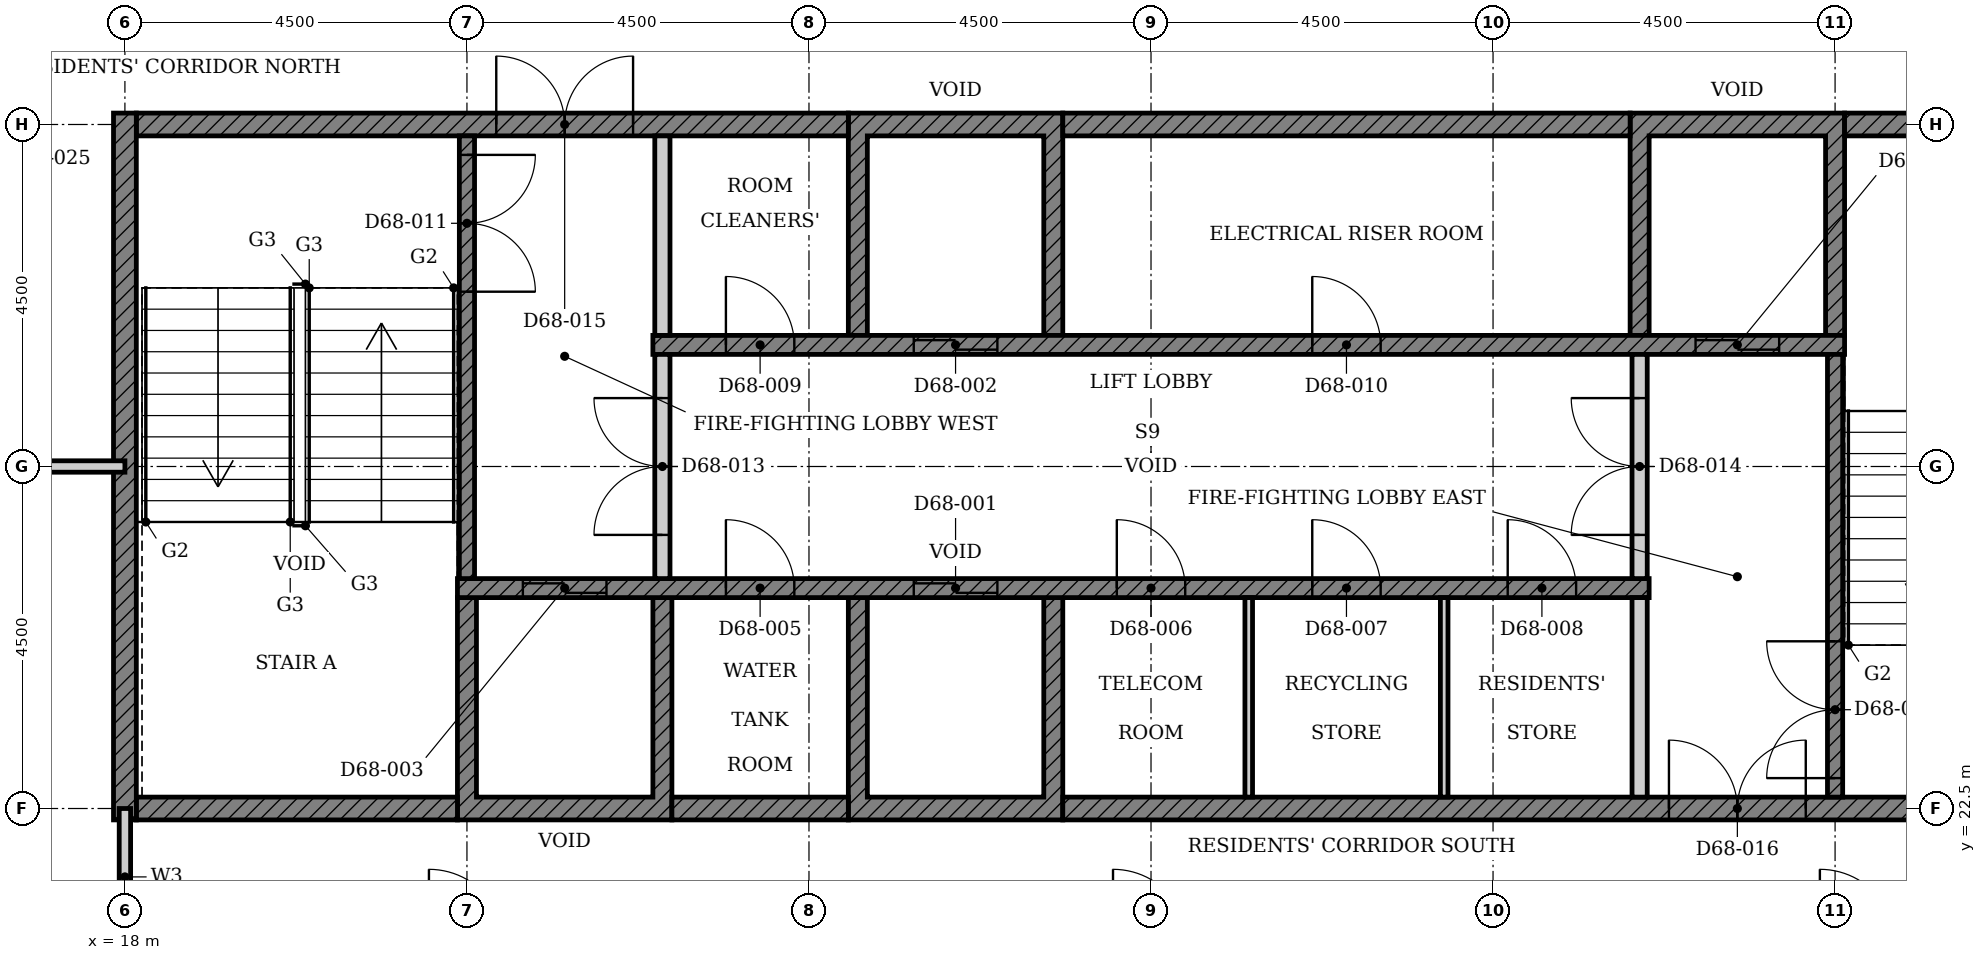
"""IFC4 building model, lengths in metres.
Left out: names, types, materials, properties, quantities, classifications, styles, units other than length and angle.
Written with IfcOpenShell. Run it as: python <this file> out.ifc"""

import sys

from ifc_helpers import new_model, si_unit, direction, frame, frame_2d, origin, place, context, subcontext, project, spatial, polyline, rectangle, outline, extrude, element, fill, save


model = new_model("IFC4")
c1 = context("Model", 3, precision=1e-05, world=origin(), true_north=direction((0.0, 1.0)))
c2 = subcontext(c1, "Body", "Model", "MODEL_VIEW")
j1 = project(units=[si_unit("LENGTHUNIT", "METRE"), si_unit("PLANEANGLEUNIT", "RADIAN")], contexts=[c1])
p1 = place(None, origin())
s1 = spatial("IfcSite", under=j1, at=p1, CompositionType="ELEMENT")
p2 = place(p1, origin())
s2 = spatial("IfcBuilding", under=s1, at=p2, CompositionType="ELEMENT")
p3 = place(p2, frame((0.0, 0.0, 267.5)))
s3 = spatial("IfcBuildingStorey", under=s2, at=p3, CompositionType="ELEMENT", Elevation=267.5)
p4 = place(p3, origin())
e1 = element("IfcWall", 1, at=p4, inside=s3, PredefinedType="SHEAR", context=c2, shape_type="SweptSolid", body=[
    extrude(outline(polyline([(22.375, 22.35), (25.197, 22.35), (25.197, 25.275), (24.947, 25.275), (24.947, 22.65), (22.625, 22.65), (22.625, 25.275), (22.375, 25.275), (22.375, 22.35)])), origin(), (0.0, 0.0, 1.0), 3.4),
])
p5 = place(p3, origin())
e2 = element("IfcWall", 2, at=p5, inside=s3, PredefinedType="SHEAR", context=c2, shape_type="SweptSolid", body=[
    extrude(outline(polyline([(27.518, 22.35), (30.339, 22.35), (30.339, 25.275), (30.089, 25.275), (30.089, 22.65), (27.768, 22.65), (27.768, 25.275), (27.518, 25.275), (27.518, 22.35)])), origin(), (0.0, 0.0, 1.0), 3.4),
])
p6 = place(p3, origin())
e3 = element("IfcWall", 3, at=p6, inside=s3, PredefinedType="SHEAR", context=c2, shape_type="SweptSolid", body=[
    extrude(outline(polyline([(27.518, 28.725), (27.768, 28.725), (27.768, 31.35), (30.089, 31.35), (30.089, 28.725), (30.339, 28.725), (30.339, 31.65), (27.518, 31.65), (27.518, 28.725)])), origin(), (0.0, 0.0, 1.0), 3.4),
])
p7 = place(p3, origin())
e4 = element("IfcWall", 4, at=p7, inside=s3, PredefinedType="SHEAR", context=c2, shape_type="SweptSolid", body=[
    extrude(outline(polyline([(37.803, 28.725), (38.053, 28.725), (38.053, 31.35), (40.375, 31.35), (40.375, 28.725), (40.625, 28.725), (40.625, 31.65), (37.803, 31.65), (37.803, 28.725)])), origin(), (0.0, 0.0, 1.0), 3.4),
])
p8 = place(p3, frame((18.15, 22.5, 0.0), z_axis=(0.0, 0.0, 1.0), x_axis=(1.0, 0.0, 0.0)))
e5 = element("IfcWall", 5, at=p8, inside=s3, PredefinedType="SHEAR", context=c2, shape_type="SweptSolid", body=[
    extrude(rectangle(XDim=4.225, YDim=0.3, at=frame_2d((2.113, 0.0))), origin(), (0.0, 0.0, 1.0), 3.4),
])
p9 = place(p3, frame((25.197, 22.5, 0.0), z_axis=(0.0, 0.0, 1.0), x_axis=(1.0, 0.0, 0.0)))
e6 = element("IfcWall", 6, at=p9, inside=s3, PredefinedType="SHEAR", context=c2, shape_type="SweptSolid", body=[
    extrude(rectangle(XDim=2.321, YDim=0.3, at=frame_2d((1.161, 0.0))), origin(), (0.0, 0.0, 1.0), 3.4),
])
p10 = place(p3, frame((30.339, 22.5, 0.0), z_axis=(0.0, 0.0, 1.0), x_axis=(1.0, 0.0, 0.0)))
e7 = element("IfcWall", 7, at=p10, inside=s3, PredefinedType="SHEAR", context=c2, shape_type="SweptSolid", body=[
    extrude(rectangle(XDim=14.511, YDim=0.3, at=frame_2d((7.255, 0.0))), origin(), (0.0, 0.0, 1.0), 3.4),
])
p11 = place(p10, frame((7.975, 0.0, 0.0)))
e8 = element("IfcOpeningElement", 8, at=p11, cuts=e7, PredefinedType="OPENING", context=c2, shape_type="SweptSolid", body=[
    extrude(rectangle(XDim=1.8, YDim=2.1, at=frame_2d((0.9, 1.05))), frame((0.0, 0.16, 0.0), z_axis=(0.0, -1.0, 0.0), x_axis=(1.0, 0.0, 0.0)), (0.0, 0.0, 1.0), 0.32),
])
p12 = place(p3, frame((18.15, 31.5, 0.0), z_axis=(0.0, 0.0, 1.0), x_axis=(1.0, 0.0, 0.0)))
e9 = element("IfcWall", 9, at=p12, inside=s3, PredefinedType="SHEAR", context=c2, shape_type="SweptSolid", body=[
    extrude(rectangle(XDim=9.368, YDim=0.3, at=frame_2d((4.684, 0.0))), origin(), (0.0, 0.0, 1.0), 3.4),
])
p13 = place(p12, frame((4.736, 0.0, 0.0)))
e10 = element("IfcOpeningElement", 10, at=p13, cuts=e9, PredefinedType="OPENING", context=c2, shape_type="SweptSolid", body=[
    extrude(rectangle(XDim=1.8, YDim=2.1, at=frame_2d((0.9, 1.05))), frame((0.0, 0.16, 0.0), z_axis=(0.0, -1.0, 0.0), x_axis=(1.0, 0.0, 0.0)), (0.0, 0.0, 1.0), 0.32),
])
p14 = place(p3, frame((30.339, 31.5, 0.0), z_axis=(0.0, 0.0, 1.0), x_axis=(1.0, 0.0, 0.0)))
e11 = element("IfcWall", 11, at=p14, inside=s3, PredefinedType="SHEAR", context=c2, shape_type="SweptSolid", body=[
    extrude(rectangle(XDim=7.464, YDim=0.3, at=frame_2d((3.732, 0.0))), origin(), (0.0, 0.0, 1.0), 3.4),
])
p15 = place(p3, frame((40.625, 31.5, 0.0), z_axis=(0.0, 0.0, 1.0), x_axis=(1.0, 0.0, 0.0)))
e12 = element("IfcWall", 12, at=p15, inside=s3, PredefinedType="SHEAR", context=c2, shape_type="SweptSolid", body=[
    extrude(rectangle(XDim=4.225, YDim=0.3, at=frame_2d((2.113, 0.0))), origin(), (0.0, 0.0, 1.0), 3.4),
])
p16 = place(p3, frame((18.0, 22.35, 0.0), z_axis=(0.0, 0.0, 1.0), x_axis=(0.0, 1.0, 0.0)))
e13 = element("IfcWall", 13, at=p16, inside=s3, PredefinedType="SHEAR", context=c2, shape_type="SweptSolid", body=[
    extrude(rectangle(XDim=9.3, YDim=0.3, at=frame_2d((4.65, 0.0))), origin(), (0.0, 0.0, 1.0), 3.4),
])
p17 = place(p3, frame((22.375, 25.4, 0.0), z_axis=(0.0, 0.0, 1.0), x_axis=(1.0, 0.0, 0.0)))
e14 = element("IfcWall", 14, at=p17, inside=s3, PredefinedType="SHEAR", context=c2, shape_type="SweptSolid", body=[
    extrude(rectangle(XDim=15.678, YDim=0.25, at=frame_2d((7.839, 0.0))), origin(), (0.0, 0.0, 1.0), 3.4),
])
p18 = place(p17, frame((6.004, 0.0, 0.0)))
e15 = element("IfcOpeningElement", 15, at=p18, cuts=e14, PredefinedType="OPENING", context=c2, shape_type="SweptSolid", body=[
    extrude(rectangle(XDim=1.1, YDim=2.1, at=frame_2d((0.55, 1.05))), frame((0.0, 0.135, 0.0), z_axis=(0.0, -1.0, 0.0), x_axis=(1.0, 0.0, 0.0)), (0.0, 0.0, 1.0), 0.27),
])
p19 = place(p17, frame((0.861, 0.0, 0.0)))
e16 = element("IfcOpeningElement", 16, at=p19, cuts=e14, PredefinedType="OPENING", context=c2, shape_type="SweptSolid", body=[
    extrude(rectangle(XDim=1.1, YDim=2.1, at=frame_2d((0.55, 1.05))), frame((0.0, 0.135, 0.0), z_axis=(0.0, -1.0, 0.0), x_axis=(1.0, 0.0, 0.0)), (0.0, 0.0, 1.0), 0.27),
])
p20 = place(p17, frame((3.532, 0.0, 0.0)))
e17 = element("IfcOpeningElement", 17, at=p20, cuts=e14, PredefinedType="OPENING", context=c2, shape_type="SweptSolid", body=[
    extrude(rectangle(XDim=0.9, YDim=2.1, at=frame_2d((0.45, 1.05))), frame((0.0, 0.135, 0.0), z_axis=(0.0, -1.0, 0.0), x_axis=(1.0, 0.0, 0.0)), (0.0, 0.0, 1.0), 0.27),
])
p21 = place(p17, frame((8.675, 0.0, 0.0)))
e18 = element("IfcOpeningElement", 18, at=p21, cuts=e14, PredefinedType="OPENING", context=c2, shape_type="SweptSolid", body=[
    extrude(rectangle(XDim=0.9, YDim=2.1, at=frame_2d((0.45, 1.05))), frame((0.0, 0.135, 0.0), z_axis=(0.0, -1.0, 0.0), x_axis=(1.0, 0.0, 0.0)), (0.0, 0.0, 1.0), 0.27),
])
p22 = place(p17, frame((11.246, 0.0, 0.0)))
e19 = element("IfcOpeningElement", 19, at=p22, cuts=e14, PredefinedType="OPENING", context=c2, shape_type="SweptSolid", body=[
    extrude(rectangle(XDim=0.9, YDim=2.1, at=frame_2d((0.45, 1.05))), frame((0.0, 0.135, 0.0), z_axis=(0.0, -1.0, 0.0), x_axis=(1.0, 0.0, 0.0)), (0.0, 0.0, 1.0), 0.27),
])
p23 = place(p17, frame((13.818, 0.0, 0.0)))
e20 = element("IfcOpeningElement", 20, at=p23, cuts=e14, PredefinedType="OPENING", context=c2, shape_type="SweptSolid", body=[
    extrude(rectangle(XDim=0.9, YDim=2.1, at=frame_2d((0.45, 1.05))), frame((0.0, 0.135, 0.0), z_axis=(0.0, -1.0, 0.0), x_axis=(1.0, 0.0, 0.0)), (0.0, 0.0, 1.0), 0.27),
])
p24 = place(p3, frame((24.947, 28.6, 0.0), z_axis=(0.0, 0.0, 1.0), x_axis=(1.0, 0.0, 0.0)))
e21 = element("IfcWall", 21, at=p24, inside=s3, PredefinedType="SHEAR", context=c2, shape_type="SweptSolid", body=[
    extrude(rectangle(XDim=15.678, YDim=0.25, at=frame_2d((7.839, 0.0))), origin(), (0.0, 0.0, 1.0), 3.4),
])
p25 = place(p24, frame((3.432, 0.0, 0.0)))
e22 = element("IfcOpeningElement", 22, at=p25, cuts=e21, PredefinedType="OPENING", context=c2, shape_type="SweptSolid", body=[
    extrude(rectangle(XDim=1.1, YDim=2.1, at=frame_2d((0.55, 1.05))), frame((0.0, 0.135, 0.0), z_axis=(0.0, -1.0, 0.0), x_axis=(1.0, 0.0, 0.0)), (0.0, 0.0, 1.0), 0.27),
])
p26 = place(p24, frame((13.718, 0.0, 0.0)))
e23 = element("IfcOpeningElement", 23, at=p26, cuts=e21, PredefinedType="OPENING", context=c2, shape_type="SweptSolid", body=[
    extrude(rectangle(XDim=1.1, YDim=2.1, at=frame_2d((0.55, 1.05))), frame((0.0, 0.135, 0.0), z_axis=(0.0, -1.0, 0.0), x_axis=(1.0, 0.0, 0.0)), (0.0, 0.0, 1.0), 0.27),
])
p27 = place(p24, frame((0.961, 0.0, 0.0)))
e24 = element("IfcOpeningElement", 24, at=p27, cuts=e21, PredefinedType="OPENING", context=c2, shape_type="SweptSolid", body=[
    extrude(rectangle(XDim=0.9, YDim=2.1, at=frame_2d((0.45, 1.05))), frame((0.0, 0.135, 0.0), z_axis=(0.0, -1.0, 0.0), x_axis=(1.0, 0.0, 0.0)), (0.0, 0.0, 1.0), 0.27),
])
p28 = place(p24, frame((8.675, 0.0, 0.0)))
e25 = element("IfcOpeningElement", 25, at=p28, cuts=e21, PredefinedType="OPENING", context=c2, shape_type="SweptSolid", body=[
    extrude(rectangle(XDim=0.9, YDim=2.1, at=frame_2d((0.45, 1.05))), frame((0.0, 0.135, 0.0), z_axis=(0.0, -1.0, 0.0), x_axis=(1.0, 0.0, 0.0)), (0.0, 0.0, 1.0), 0.27),
])
p29 = place(p3, frame((37.928, 22.65, 0.0), z_axis=(0.0, 0.0, 1.0), x_axis=(0.0, 1.0, 0.0)))
e26 = element("IfcWall", 26, at=p29, inside=s3, PredefinedType="PARTITIONING", context=c2, shape_type="SweptSolid", body=[
    extrude(rectangle(XDim=2.625, YDim=0.2, at=frame_2d((1.312, 0.0))), origin(), (0.0, 0.0, 1.0), 3.4),
])
for number, where, z_axis, x_axis in (
    (27, (32.786, 22.65, 0.0), (0.0, 0.0, 1.0), (0.0, 1.0, 0.0)),
    (28, (35.357, 22.65, 0.0), (0.0, 0.0, 1.0), (0.0, 1.0, 0.0)),
):
    element("IfcWall", number, at=place(p3, frame(where, z_axis=z_axis, x_axis=x_axis)), inside=s3, PredefinedType="PARTITIONING", context=c2, shape_type="SweptSolid", body=[
        extrude(rectangle(XDim=2.625, YDim=0.1, at=frame_2d((1.312, 0.0))), origin(), (0.0, 0.0, 1.0), 3.4),
    ])
p30 = place(p3, frame((25.072, 28.725, 0.0), z_axis=(0.0, 0.0, 1.0), x_axis=(0.0, 1.0, 0.0)))
e29 = element("IfcWall", 29, at=p30, inside=s3, PredefinedType="PARTITIONING", context=c2, shape_type="SweptSolid", body=[
    extrude(rectangle(XDim=2.625, YDim=0.2, at=frame_2d((1.312, 0.0))), origin(), (0.0, 0.0, 1.0), 3.4),
])
p31 = place(p3, frame((22.5, 31.35, 0.0), z_axis=(0.0, 0.0, 1.0), x_axis=(0.0, -1.0, 0.0)))
e30 = element("IfcWall", 30, at=p31, inside=s3, PredefinedType="SHEAR", context=c2, shape_type="SweptSolid", body=[
    extrude(rectangle(XDim=5.825, YDim=0.2, at=frame_2d((2.913, 0.0))), origin(), (0.0, 0.0, 1.0), 3.4),
])
p32 = place(p31, frame((0.25, 0.0, 0.0)))
e31 = element("IfcOpeningElement", 31, at=p32, cuts=e30, PredefinedType="OPENING", context=c2, shape_type="SweptSolid", body=[
    extrude(rectangle(XDim=1.8, YDim=2.1, at=frame_2d((0.9, 1.05))), frame((0.0, 0.11, 0.0), z_axis=(0.0, -1.0, 0.0), x_axis=(1.0, 0.0, 0.0)), (0.0, 0.0, 1.0), 0.22),
])
p33 = place(p3, frame((40.5, 22.65, 0.0), z_axis=(0.0, 0.0, 1.0), x_axis=(0.0, 1.0, 0.0)))
e32 = element("IfcWall", 32, at=p33, inside=s3, PredefinedType="SHEAR", context=c2, shape_type="SweptSolid", body=[
    extrude(rectangle(XDim=5.825, YDim=0.2, at=frame_2d((2.913, 0.0))), origin(), (0.0, 0.0, 1.0), 3.4),
])
p34 = place(p33, frame((0.25, 0.0, 0.0)))
e33 = element("IfcOpeningElement", 33, at=p34, cuts=e32, PredefinedType="OPENING", context=c2, shape_type="SweptSolid", body=[
    extrude(rectangle(XDim=1.8, YDim=2.1, at=frame_2d((0.9, 1.05))), frame((0.0, 0.11, 0.0), z_axis=(0.0, -1.0, 0.0), x_axis=(1.0, 0.0, 0.0)), (0.0, 0.0, 1.0), 0.22),
])
p35 = place(p3, frame((25.072, 25.525, 0.0), z_axis=(0.0, 0.0, 1.0), x_axis=(0.0, 1.0, 0.0)))
e34 = element("IfcWall", 34, at=p35, inside=s3, PredefinedType="PARTITIONING", context=c2, shape_type="SweptSolid", body=[
    extrude(rectangle(XDim=2.95, YDim=0.2, at=frame_2d((1.475, 0.0))), origin(), (0.0, 0.0, 1.0), 3.4),
])
p36 = place(p35, frame((0.575, 0.0, 0.0)))
e35 = element("IfcOpeningElement", 35, at=p36, cuts=e34, PredefinedType="OPENING", context=c2, shape_type="SweptSolid", body=[
    extrude(rectangle(XDim=1.8, YDim=2.1, at=frame_2d((0.9, 1.05))), frame((0.0, 0.11, 0.0), z_axis=(0.0, -1.0, 0.0), x_axis=(1.0, 0.0, 0.0)), (0.0, 0.0, 1.0), 0.22),
])
p37 = place(p3, frame((37.928, 25.525, 0.0), z_axis=(0.0, 0.0, 1.0), x_axis=(0.0, 1.0, 0.0)))
e36 = element("IfcWall", 36, at=p37, inside=s3, PredefinedType="PARTITIONING", context=c2, shape_type="SweptSolid", body=[
    extrude(rectangle(XDim=2.95, YDim=0.2, at=frame_2d((1.475, 0.0))), origin(), (0.0, 0.0, 1.0), 3.4),
])
p38 = place(p37, frame((0.575, 0.0, 0.0)))
e37 = element("IfcOpeningElement", 37, at=p38, cuts=e36, PredefinedType="OPENING", context=c2, shape_type="SweptSolid", body=[
    extrude(rectangle(XDim=1.8, YDim=2.1, at=frame_2d((0.9, 1.05))), frame((0.0, 0.11, 0.0), z_axis=(0.0, -1.0, 0.0), x_axis=(1.0, 0.0, 0.0)), (0.0, 0.0, 1.0), 0.22),
])
p39 = place(p3, frame((4.5, 27.0, 0.0), z_axis=(0.0, 0.0, 1.0), x_axis=(1.0, 0.0, 0.0)))
e38 = element("IfcWall", 38, at=p39, inside=s3, PredefinedType="PARTITIONING", context=c2, shape_type="SweptSolid", body=[
    extrude(rectangle(XDim=13.5, YDim=0.15, at=frame_2d((6.75, 0.0))), origin(), (0.0, 0.0, 1.0), 2.68),
])
p40 = place(p39, frame((5.35, 0.0, 0.0)))
e39 = element("IfcOpeningElement", 39, at=p40, cuts=e38, PredefinedType="OPENING", context=c2, shape_type="SweptSolid", body=[
    extrude(rectangle(XDim=1.0, YDim=2.1, at=frame_2d((0.5, 1.05))), frame((0.0, 0.085, 0.0), z_axis=(0.0, -1.0, 0.0), x_axis=(1.0, 0.0, 0.0)), (0.0, 0.0, 1.0), 0.17),
])
p41 = place(p3, frame((18.0, 20.7, 0.0), z_axis=(0.0, 0.0, 1.0), x_axis=(0.0, 1.0, 0.0)))
e40 = element("IfcWall", 40, at=p41, inside=s3, PredefinedType="PARTITIONING", context=c2, shape_type="SweptSolid", body=[
    extrude(rectangle(XDim=1.8, YDim=0.15, at=frame_2d((0.9, 0.0))), origin(), (0.0, 0.0, 1.0), 3.4),
])
p42 = place(p18, origin())
e41 = element("IfcDoor", 41, at=p42, inside=s3, OperationType="DOUBLE_DOOR_SLIDING", PredefinedType="DOOR", context=c2, shape_type="SweptSolid", body=[
    extrude(rectangle(XDim=1.1, YDim=2.1, at=frame_2d((0.55, 1.05))), frame((0.0, 0.025, 0.0), z_axis=(0.0, -1.0, 0.0), x_axis=(1.0, 0.0, 0.0)), (0.0, 0.0, 1.0), 0.05),
])
fill(e15, e41)
p43 = place(p25, origin())
e42 = element("IfcDoor", 42, at=p43, inside=s3, OperationType="DOUBLE_DOOR_SLIDING", PredefinedType="DOOR", context=c2, shape_type="SweptSolid", body=[
    extrude(rectangle(XDim=1.1, YDim=2.1, at=frame_2d((0.55, 1.05))), frame((0.0, 0.025, 0.0), z_axis=(0.0, -1.0, 0.0), x_axis=(1.0, 0.0, 0.0)), (0.0, 0.0, 1.0), 0.05),
])
fill(e22, e42)
p44 = place(p19, origin())
e43 = element("IfcDoor", 43, at=p44, inside=s3, OperationType="DOUBLE_DOOR_SLIDING", PredefinedType="DOOR", context=c2, shape_type="SweptSolid", body=[
    extrude(rectangle(XDim=1.1, YDim=2.1, at=frame_2d((0.55, 1.05))), frame((0.0, 0.025, 0.0), z_axis=(0.0, -1.0, 0.0), x_axis=(1.0, 0.0, 0.0)), (0.0, 0.0, 1.0), 0.05),
])
fill(e16, e43)
p45 = place(p26, origin())
e44 = element("IfcDoor", 44, at=p45, inside=s3, OperationType="DOUBLE_DOOR_SLIDING", PredefinedType="DOOR", context=c2, shape_type="SweptSolid", body=[
    extrude(rectangle(XDim=1.1, YDim=2.1, at=frame_2d((0.55, 1.05))), frame((0.0, 0.025, 0.0), z_axis=(0.0, -1.0, 0.0), x_axis=(1.0, 0.0, 0.0)), (0.0, 0.0, 1.0), 0.05),
])
fill(e23, e44)
p46 = place(p20, origin())
e45 = element("IfcDoor", 45, at=p46, inside=s3, OperationType="SINGLE_SWING_LEFT", PredefinedType="DOOR", context=c2, shape_type="SweptSolid", body=[
    extrude(rectangle(XDim=0.9, YDim=2.1, at=frame_2d((0.45, 1.05))), frame((0.0, 0.025, 0.0), z_axis=(0.0, -1.0, 0.0), x_axis=(1.0, 0.0, 0.0)), (0.0, 0.0, 1.0), 0.05),
])
fill(e17, e45)
p47 = place(p21, origin())
e46 = element("IfcDoor", 46, at=p47, inside=s3, OperationType="SINGLE_SWING_LEFT", PredefinedType="DOOR", context=c2, shape_type="SweptSolid", body=[
    extrude(rectangle(XDim=0.9, YDim=2.1, at=frame_2d((0.45, 1.05))), frame((0.0, 0.025, 0.0), z_axis=(0.0, -1.0, 0.0), x_axis=(1.0, 0.0, 0.0)), (0.0, 0.0, 1.0), 0.05),
])
fill(e18, e46)
p48 = place(p22, origin())
e47 = element("IfcDoor", 47, at=p48, inside=s3, OperationType="SINGLE_SWING_LEFT", PredefinedType="DOOR", context=c2, shape_type="SweptSolid", body=[
    extrude(rectangle(XDim=0.9, YDim=2.1, at=frame_2d((0.45, 1.05))), frame((0.0, 0.025, 0.0), z_axis=(0.0, -1.0, 0.0), x_axis=(1.0, 0.0, 0.0)), (0.0, 0.0, 1.0), 0.05),
])
fill(e19, e47)
p49 = place(p23, origin())
e48 = element("IfcDoor", 48, at=p49, inside=s3, OperationType="SINGLE_SWING_LEFT", PredefinedType="DOOR", context=c2, shape_type="SweptSolid", body=[
    extrude(rectangle(XDim=0.9, YDim=2.1, at=frame_2d((0.45, 1.05))), frame((0.0, 0.025, 0.0), z_axis=(0.0, -1.0, 0.0), x_axis=(1.0, 0.0, 0.0)), (0.0, 0.0, 1.0), 0.05),
])
fill(e20, e48)
p50 = place(p27, origin())
e49 = element("IfcDoor", 49, at=p50, inside=s3, OperationType="SINGLE_SWING_LEFT", PredefinedType="DOOR", context=c2, shape_type="SweptSolid", body=[
    extrude(rectangle(XDim=0.9, YDim=2.1, at=frame_2d((0.45, 1.05))), frame((0.0, 0.025, 0.0), z_axis=(0.0, -1.0, 0.0), x_axis=(1.0, 0.0, 0.0)), (0.0, 0.0, 1.0), 0.05),
])
fill(e24, e49)
p51 = place(p28, origin())
e50 = element("IfcDoor", 50, at=p51, inside=s3, OperationType="SINGLE_SWING_LEFT", PredefinedType="DOOR", context=c2, shape_type="SweptSolid", body=[
    extrude(rectangle(XDim=0.9, YDim=2.1, at=frame_2d((0.45, 1.05))), frame((0.0, 0.025, 0.0), z_axis=(0.0, -1.0, 0.0), x_axis=(1.0, 0.0, 0.0)), (0.0, 0.0, 1.0), 0.05),
])
fill(e25, e50)
p52 = place(p32, origin())
e51 = element("IfcDoor", 51, at=p52, inside=s3, OperationType="DOUBLE_DOOR_SINGLE_SWING", PredefinedType="DOOR", context=c2, shape_type="SweptSolid", body=[
    extrude(rectangle(XDim=1.8, YDim=2.1, at=frame_2d((0.9, 1.05))), frame((0.0, 0.025, 0.0), z_axis=(0.0, -1.0, 0.0), x_axis=(1.0, 0.0, 0.0)), (0.0, 0.0, 1.0), 0.05),
])
fill(e31, e51)
p53 = place(p34, origin())
e52 = element("IfcDoor", 52, at=p53, inside=s3, OperationType="DOUBLE_DOOR_SINGLE_SWING", PredefinedType="DOOR", context=c2, shape_type="SweptSolid", body=[
    extrude(rectangle(XDim=1.8, YDim=2.1, at=frame_2d((0.9, 1.05))), frame((0.0, 0.025, 0.0), z_axis=(0.0, -1.0, 0.0), x_axis=(1.0, 0.0, 0.0)), (0.0, 0.0, 1.0), 0.05),
])
fill(e33, e52)
p54 = place(p36, origin())
e53 = element("IfcDoor", 53, at=p54, inside=s3, OperationType="DOUBLE_DOOR_SINGLE_SWING", PredefinedType="DOOR", context=c2, shape_type="SweptSolid", body=[
    extrude(rectangle(XDim=1.8, YDim=2.1, at=frame_2d((0.9, 1.05))), frame((0.0, 0.025, 0.0), z_axis=(0.0, -1.0, 0.0), x_axis=(1.0, 0.0, 0.0)), (0.0, 0.0, 1.0), 0.05),
])
fill(e35, e53)
p55 = place(p38, origin())
e54 = element("IfcDoor", 54, at=p55, inside=s3, OperationType="DOUBLE_DOOR_SINGLE_SWING", PredefinedType="DOOR", context=c2, shape_type="SweptSolid", body=[
    extrude(rectangle(XDim=1.8, YDim=2.1, at=frame_2d((0.9, 1.05))), frame((0.0, 0.025, 0.0), z_axis=(0.0, -1.0, 0.0), x_axis=(1.0, 0.0, 0.0)), (0.0, 0.0, 1.0), 0.05),
])
fill(e37, e54)
p56 = place(p13, origin())
e55 = element("IfcDoor", 55, at=p56, inside=s3, OperationType="DOUBLE_DOOR_SINGLE_SWING", PredefinedType="DOOR", context=c2, shape_type="SweptSolid", body=[
    extrude(rectangle(XDim=1.8, YDim=2.1, at=frame_2d((0.9, 1.05))), frame((0.0, 0.025, 0.0), z_axis=(0.0, -1.0, 0.0), x_axis=(1.0, 0.0, 0.0)), (0.0, 0.0, 1.0), 0.05),
])
fill(e10, e55)
p57 = place(p11, origin())
e56 = element("IfcDoor", 56, at=p57, inside=s3, OperationType="DOUBLE_DOOR_SINGLE_SWING", PredefinedType="DOOR", context=c2, shape_type="SweptSolid", body=[
    extrude(rectangle(XDim=1.8, YDim=2.1, at=frame_2d((0.9, 1.05))), frame((0.0, 0.025, 0.0), z_axis=(0.0, -1.0, 0.0), x_axis=(1.0, 0.0, 0.0)), (0.0, 0.0, 1.0), 0.05),
])
fill(e8, e56)
save(model, sys.argv[1])
